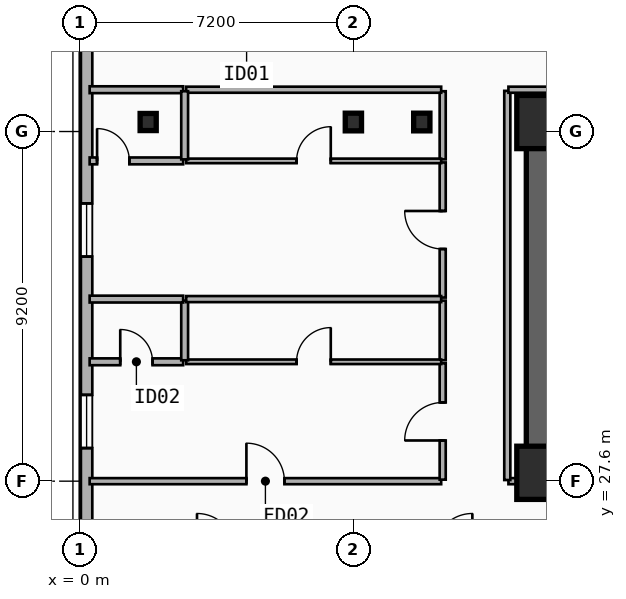
"""IFC4 building model, lengths in metres.
Left out: names, types, materials, properties, quantities, classifications, styles, units other than length and angle.
Written with IfcOpenShell. Run it as: python <this file> out.ifc"""

import sys

from ifc_helpers import new_model, si_unit, direction, frame, frame_2d, origin, origin_2d, place, context, subcontext, project, spatial, rectangle, i_section, extrude, element, fill, save


model = new_model("IFC4")
c1 = context("Model", 3, precision=1e-05, world=origin(), true_north=direction((0.0, 1.0)))
c2 = subcontext(c1, "Body", "Model", "MODEL_VIEW")
j1 = project(units=[si_unit("LENGTHUNIT", "METRE"), si_unit("PLANEANGLEUNIT", "RADIAN")], contexts=[c1])
p1 = place(None, origin())
s1 = spatial("IfcSite", under=j1, at=p1, CompositionType="ELEMENT")
p2 = place(p1, origin())
s2 = spatial("IfcBuilding", under=s1, at=p2, CompositionType="ELEMENT")
p3 = place(p2, frame((0.0, 0.0, 32.5)))
s3 = spatial("IfcBuildingStorey", under=s2, at=p3, CompositionType="ELEMENT", Elevation=32.5)
p4 = place(p3, frame((12.15, 37.05, 0.0), z_axis=(0.0, 0.0, 1.0), x_axis=(1.0, 0.0, 0.0)))
e1 = element("IfcWall", 1, at=p4, inside=s3, PredefinedType="SHEAR", context=c2, shape_type="SweptSolid", body=[
    extrude(rectangle(XDim=33.23, YDim=0.8, at=frame_2d((16.615, 0.0))), origin(), (0.0, 0.0, 1.0), 3.5),
])
p5 = place(p3, frame((21.18, 27.82, 0.0), z_axis=(0.0, 0.0, 1.0), x_axis=(-1.0, 0.0, 0.0)))
e2 = element("IfcWall", 2, at=p5, inside=s3, PredefinedType="SHEAR", context=c2, shape_type="SweptSolid", body=[
    extrude(rectangle(XDim=9.03, YDim=0.8, at=frame_2d((4.515, 0.0))), origin(), (0.0, 0.0, 1.0), 3.5),
])
p6 = place(p5, frame((2.68, 0.0, 0.0)))
e3 = element("IfcOpeningElement", 3, at=p6, cuts=e2, PredefinedType="OPENING", context=c2, shape_type="SweptSolid", body=[
    extrude(rectangle(XDim=1.1, YDim=2.15, at=frame_2d((0.55, 1.075))), frame((0.0, 0.41, 0.0), z_axis=(0.0, -1.0, 0.0), x_axis=(1.0, 0.0, 0.0)), (0.0, 0.0, 1.0), 0.82),
])
p7 = place(p3, frame((12.15, 28.22, 0.0), z_axis=(0.0, 0.0, 1.0), x_axis=(0.0, 1.0, 0.0)))
e4 = element("IfcWall", 4, at=p7, inside=s3, PredefinedType="SHEAR", context=c2, shape_type="SweptSolid", body=[
    extrude(rectangle(XDim=8.43, YDim=0.8, at=frame_2d((4.215, 0.0))), origin(), (0.0, 0.0, 1.0), 3.5),
])
for number, where, z_axis, x_axis in (
    (5, (12.2, 27.82, 0.0), (0.0, 0.0, 1.0), (1.0, 0.0, 0.0)),
    (6, (12.2, 37.05, 0.0), (0.0, 0.0, 1.0), (1.0, 0.0, 0.0)),
):
    element("IfcColumn", number, at=place(p3, frame(where, z_axis=z_axis, x_axis=x_axis)), inside=s3, PredefinedType="COLUMN", context=c2, shape_type="SweptSolid", body=[
        extrude(rectangle(XDim=1.4, YDim=1.4, at=origin_2d()), origin(), (0.0, 0.0, 1.0), 3.5),
    ])
p8 = place(p3, frame((9.0, 37.05, 0.0), z_axis=(0.0, 0.0, 1.0), x_axis=(1.0, 0.0, 0.0)))
e7 = element("IfcColumn", 7, at=p8, inside=s3, PredefinedType="COLUMN", context=c2, shape_type="SweptSolid", body=[
    extrude(i_section(OverallWidth=0.428, OverallDepth=0.465, WebThickness=0.045, FlangeThickness=0.073, FilletRadius=0.015, at=origin_2d()), origin(), (0.0, 0.0, 1.0), 3.5),
])
p9 = place(p3, frame((1.8, 37.05, 0.0), z_axis=(0.0, 0.0, 1.0), x_axis=(1.0, 0.0, 0.0)))
e8 = element("IfcColumn", 8, at=p9, inside=s3, PredefinedType="COLUMN", context=c2, shape_type="SweptSolid", body=[
    extrude(i_section(OverallWidth=0.424, OverallDepth=0.45, WebThickness=0.041, FlangeThickness=0.065, FilletRadius=0.015, at=origin_2d()), origin(), (0.0, 0.0, 1.0), 3.5),
])
p10 = place(p3, frame((7.2, 37.05, 0.0), z_axis=(0.0, 0.0, 1.0), x_axis=(1.0, 0.0, 0.0)))
e9 = element("IfcColumn", 9, at=p10, inside=s3, PredefinedType="COLUMN", context=c2, shape_type="SweptSolid", body=[
    extrude(i_section(OverallWidth=0.428, OverallDepth=0.465, WebThickness=0.045, FlangeThickness=0.073, FilletRadius=0.015, at=origin_2d()), origin(), (0.0, 0.0, 1.0), 3.5),
])
p11 = place(p3, frame((0.18, 25.8, 0.0), z_axis=(0.0, 0.0, 1.0), x_axis=(0.0, 1.0, 0.0)))
e10 = element("IfcWall", 10, at=p11, inside=s3, PredefinedType="SOLIDWALL", context=c2, shape_type="SweptSolid", body=[
    extrude(rectangle(XDim=15.2, YDim=0.3, at=frame_2d((7.6, 0.0))), origin(), (0.0, 0.0, 1.0), 3.24),
])
p12 = place(p11, frame((2.67, 0.0, 0.48)))
e11 = element("IfcOpeningElement", 11, at=p12, cuts=e10, PredefinedType="OPENING", context=c2, shape_type="SweptSolid", body=[
    extrude(rectangle(XDim=1.4, YDim=1.8, at=frame_2d((0.7, 0.9))), frame((0.0, 0.16, 0.0), z_axis=(0.0, -1.0, 0.0), x_axis=(1.0, 0.0, 0.0)), (0.0, 0.0, 1.0), 0.32),
])
p13 = place(p11, frame((7.709, 0.0, 0.48)))
e12 = element("IfcOpeningElement", 12, at=p13, cuts=e10, PredefinedType="OPENING", context=c2, shape_type="SweptSolid", body=[
    extrude(rectangle(XDim=1.4, YDim=1.8, at=frame_2d((0.7, 0.9))), frame((0.0, 0.16, 0.0), z_axis=(0.0, -1.0, 0.0), x_axis=(1.0, 0.0, 0.0)), (0.0, 0.0, 1.0), 0.32),
])
p14 = place(p3, frame((0.26, 27.6, 0.0), z_axis=(0.0, 0.0, 1.0), x_axis=(1.0, 0.0, 0.0)))
e13 = element("IfcWall", 13, at=p14, inside=s3, PredefinedType="PARTITIONING", context=c2, shape_type="SweptSolid", body=[
    extrude(rectangle(XDim=9.25, YDim=0.16, at=frame_2d((4.625, 0.0))), origin(), (0.0, 0.0, 1.0), 2.57),
])
p15 = place(p14, frame((4.125, 0.0, 0.0)))
e14 = element("IfcOpeningElement", 14, at=p15, cuts=e13, PredefinedType="OPENING", context=c2, shape_type="SweptSolid", body=[
    extrude(rectangle(XDim=1.0, YDim=2.15, at=frame_2d((0.5, 1.075))), frame((0.0, 0.09, 0.0), z_axis=(0.0, -1.0, 0.0), x_axis=(1.0, 0.0, 0.0)), (0.0, 0.0, 1.0), 0.18),
])
p16 = place(p3, frame((9.55, 27.64, 0.0), z_axis=(0.0, 0.0, 1.0), x_axis=(0.0, 1.0, 0.0)))
e15 = element("IfcWall", 15, at=p16, inside=s3, PredefinedType="PARTITIONING", context=c2, shape_type="SweptSolid", body=[
    extrude(rectangle(XDim=3.061, YDim=0.16, at=frame_2d((1.531, 0.0))), origin(), (0.0, 0.0, 1.0), 3.24),
])
p17 = place(p16, frame((1.031, 0.0, 0.0)))
e16 = element("IfcOpeningElement", 16, at=p17, cuts=e15, PredefinedType="OPENING", context=c2, shape_type="SweptSolid", body=[
    extrude(rectangle(XDim=1.0, YDim=2.15, at=frame_2d((0.5, 1.075))), frame((0.0, 0.09, 0.0), z_axis=(0.0, -1.0, 0.0), x_axis=(1.0, 0.0, 0.0)), (0.0, 0.0, 1.0), 0.18),
])
p18 = place(p3, frame((9.55, 30.781, 0.0), z_axis=(0.0, 0.0, 1.0), x_axis=(0.0, 1.0, 0.0)))
e17 = element("IfcWall", 17, at=p18, inside=s3, PredefinedType="PARTITIONING", context=c2, shape_type="SweptSolid", body=[
    extrude(rectangle(XDim=1.57, YDim=0.16, at=frame_2d((0.785, 0.0))), origin(), (0.0, 0.0, 1.0), 3.24),
])
p19 = place(p3, frame((9.55, 32.431, 0.0), z_axis=(0.0, 0.0, 1.0), x_axis=(0.0, 1.0, 0.0)))
e18 = element("IfcWall", 18, at=p19, inside=s3, PredefinedType="PARTITIONING", context=c2, shape_type="SweptSolid", body=[
    extrude(rectangle(XDim=3.556, YDim=0.16, at=frame_2d((1.778, 0.0))), origin(), (0.0, 0.0, 1.0), 3.24),
])
p20 = place(p19, frame((1.278, 0.0, 0.0)))
e19 = element("IfcOpeningElement", 19, at=p20, cuts=e18, PredefinedType="OPENING", context=c2, shape_type="SweptSolid", body=[
    extrude(rectangle(XDim=1.0, YDim=2.15, at=frame_2d((0.5, 1.075))), frame((0.0, 0.09, 0.0), z_axis=(0.0, -1.0, 0.0), x_axis=(1.0, 0.0, 0.0)), (0.0, 0.0, 1.0), 0.18),
])
p21 = place(p3, frame((9.55, 36.067, 0.0), z_axis=(0.0, 0.0, 1.0), x_axis=(0.0, 1.0, 0.0)))
e20 = element("IfcWall", 20, at=p21, inside=s3, PredefinedType="PARTITIONING", context=c2, shape_type="SweptSolid", body=[
    extrude(rectangle(XDim=1.793, YDim=0.16, at=frame_2d((0.896, 0.0))), origin(), (0.0, 0.0, 1.0), 2.72),
])
p22 = place(p3, frame((0.26, 37.9, 0.0), z_axis=(0.0, 0.0, 1.0), x_axis=(1.0, 0.0, 0.0)))
e21 = element("IfcWall", 21, at=p22, inside=s3, PredefinedType="PLUMBINGWALL", context=c2, shape_type="SweptSolid", body=[
    extrude(rectangle(XDim=2.46, YDim=0.18, at=frame_2d((1.23, 0.0))), origin(), (0.0, 0.0, 1.0), 3.24),
])
p23 = place(p3, frame((2.8, 37.9, 0.0), z_axis=(0.0, 0.0, 1.0), x_axis=(1.0, 0.0, 0.0)))
e22 = element("IfcWall", 22, at=p23, inside=s3, PredefinedType="PARTITIONING", context=c2, shape_type="SweptSolid", body=[
    extrude(rectangle(XDim=6.71, YDim=0.16, at=frame_2d((3.355, 0.0))), origin(), (0.0, 0.0, 1.0), 3.24),
])
p24 = place(p3, frame((0.26, 30.741, 0.0), z_axis=(0.0, 0.0, 1.0), x_axis=(1.0, 0.0, 0.0)))
e23 = element("IfcWall", 23, at=p24, inside=s3, PredefinedType="PLUMBINGWALL", context=c2, shape_type="SweptSolid", body=[
    extrude(rectangle(XDim=2.46, YDim=0.18, at=frame_2d((1.23, 0.0))), origin(), (0.0, 0.0, 1.0), 2.57),
])
p25 = place(p24, frame((0.805, 0.0, 0.0)))
e24 = element("IfcOpeningElement", 24, at=p25, cuts=e23, PredefinedType="OPENING", context=c2, shape_type="SweptSolid", body=[
    extrude(rectangle(XDim=0.85, YDim=2.1, at=frame_2d((0.425, 1.05))), frame((0.0, 0.1, 0.0), z_axis=(0.0, -1.0, 0.0), x_axis=(1.0, 0.0, 0.0)), (0.0, 0.0, 1.0), 0.2),
])
p26 = place(p3, frame((2.8, 30.741, 0.0), z_axis=(0.0, 0.0, 1.0), x_axis=(1.0, 0.0, 0.0)))
e25 = element("IfcWall", 25, at=p26, inside=s3, PredefinedType="PARTITIONING", context=c2, shape_type="SweptSolid", body=[
    extrude(rectangle(XDim=6.71, YDim=0.12, at=frame_2d((3.355, 0.0))), origin(), (0.0, 0.0, 1.0), 2.57),
])
p27 = place(p26, frame((2.905, 0.0, 0.0)))
e26 = element("IfcOpeningElement", 26, at=p27, cuts=e25, PredefinedType="OPENING", context=c2, shape_type="SweptSolid", body=[
    extrude(rectangle(XDim=0.9, YDim=2.1, at=frame_2d((0.45, 1.05))), frame((0.0, 0.07, 0.0), z_axis=(0.0, -1.0, 0.0), x_axis=(1.0, 0.0, 0.0)), (0.0, 0.0, 1.0), 0.14),
])
p28 = place(p3, frame((2.76, 30.781, 0.0), z_axis=(0.0, 0.0, 1.0), x_axis=(0.0, 1.0, 0.0)))
e27 = element("IfcWall", 27, at=p28, inside=s3, PredefinedType="PLUMBINGWALL", context=c2, shape_type="SweptSolid", body=[
    extrude(rectangle(XDim=1.57, YDim=0.18, at=frame_2d((0.785, 0.0))), origin(), (0.0, 0.0, 1.0), 3.24),
])
p29 = place(p3, frame((0.26, 32.391, 0.0), z_axis=(0.0, 0.0, 1.0), x_axis=(1.0, 0.0, 0.0)))
e28 = element("IfcWall", 28, at=p29, inside=s3, PredefinedType="PLUMBINGWALL", context=c2, shape_type="SweptSolid", body=[
    extrude(rectangle(XDim=2.46, YDim=0.18, at=frame_2d((1.23, 0.0))), origin(), (0.0, 0.0, 1.0), 2.57),
])
p30 = place(p3, frame((2.8, 32.391, 0.0), z_axis=(0.0, 0.0, 1.0), x_axis=(1.0, 0.0, 0.0)))
e29 = element("IfcWall", 29, at=p30, inside=s3, PredefinedType="PARTITIONING", context=c2, shape_type="SweptSolid", body=[
    extrude(rectangle(XDim=6.71, YDim=0.16, at=frame_2d((3.355, 0.0))), origin(), (0.0, 0.0, 1.0), 2.57),
])
p31 = place(p3, frame((0.26, 36.027, 0.0), z_axis=(0.0, 0.0, 1.0), x_axis=(1.0, 0.0, 0.0)))
e30 = element("IfcWall", 30, at=p31, inside=s3, PredefinedType="PLUMBINGWALL", context=c2, shape_type="SweptSolid", body=[
    extrude(rectangle(XDim=2.46, YDim=0.18, at=frame_2d((1.23, 0.0))), origin(), (0.0, 0.0, 1.0), 2.57),
])
p32 = place(p31, frame((0.195, 0.0, 0.0)))
e31 = element("IfcOpeningElement", 31, at=p32, cuts=e30, PredefinedType="OPENING", context=c2, shape_type="SweptSolid", body=[
    extrude(rectangle(XDim=0.85, YDim=2.1, at=frame_2d((0.425, 1.05))), frame((0.0, 0.1, 0.0), z_axis=(0.0, -1.0, 0.0), x_axis=(1.0, 0.0, 0.0)), (0.0, 0.0, 1.0), 0.2),
])
p33 = place(p3, frame((2.8, 36.027, 0.0), z_axis=(0.0, 0.0, 1.0), x_axis=(1.0, 0.0, 0.0)))
e32 = element("IfcWall", 32, at=p33, inside=s3, PredefinedType="PARTITIONING", context=c2, shape_type="SweptSolid", body=[
    extrude(rectangle(XDim=6.71, YDim=0.12, at=frame_2d((3.355, 0.0))), origin(), (0.0, 0.0, 1.0), 2.57),
])
p34 = place(p33, frame((2.905, 0.0, 0.0)))
e33 = element("IfcOpeningElement", 33, at=p34, cuts=e32, PredefinedType="OPENING", context=c2, shape_type="SweptSolid", body=[
    extrude(rectangle(XDim=0.9, YDim=2.1, at=frame_2d((0.45, 1.05))), frame((0.0, 0.07, 0.0), z_axis=(0.0, -1.0, 0.0), x_axis=(1.0, 0.0, 0.0)), (0.0, 0.0, 1.0), 0.14),
])
p35 = place(p3, frame((2.76, 36.067, 0.0), z_axis=(0.0, 0.0, 1.0), x_axis=(0.0, 1.0, 0.0)))
e34 = element("IfcWall", 34, at=p35, inside=s3, PredefinedType="PLUMBINGWALL", context=c2, shape_type="SweptSolid", body=[
    extrude(rectangle(XDim=1.793, YDim=0.18, at=frame_2d((0.896, 0.0))), origin(), (0.0, 0.0, 1.0), 2.72),
])
p36 = place(p3, frame((11.28, 27.6, 0.0), z_axis=(0.0, 0.0, 1.0), x_axis=(1.0, 0.0, 0.0)))
e35 = element("IfcWall", 35, at=p36, inside=s3, PredefinedType="PARTITIONING", context=c2, shape_type="SweptSolid", body=[
    extrude(rectangle(XDim=0.84, YDim=0.16, at=frame_2d((0.42, 0.0))), origin(), (0.0, 0.0, 1.0), 2.28),
])
p37 = place(p3, frame((11.25, 27.63, 0.0), z_axis=(0.0, 0.0, 1.0), x_axis=(0.0, 1.0, 0.0)))
e36 = element("IfcWall", 36, at=p37, inside=s3, PredefinedType="PARTITIONING", context=c2, shape_type="SweptSolid", body=[
    extrude(rectangle(XDim=10.24, YDim=0.16, at=frame_2d((5.12, 0.0))), origin(), (0.0, 0.0, 1.0), 2.72),
])
p38 = place(p3, frame((11.28, 37.9, 0.0), z_axis=(0.0, 0.0, 1.0), x_axis=(1.0, 0.0, 0.0)))
e37 = element("IfcWall", 37, at=p38, inside=s3, PredefinedType="PARTITIONING", context=c2, shape_type="SweptSolid", body=[
    extrude(rectangle(XDim=35.04, YDim=0.16, at=frame_2d((17.52, 0.0))), origin(), (0.0, 0.0, 1.0), 3.24),
])
p39 = place(p12, origin())
e38 = element("IfcWindow", 38, at=p39, inside=s3, PartitioningType="SINGLE_PANEL", PredefinedType="WINDOW", context=c2, shape_type="SweptSolid", body=[
    extrude(rectangle(XDim=1.4, YDim=1.8, at=frame_2d((0.7, 0.9))), frame((0.0, 0.03, 0.0), z_axis=(0.0, -1.0, 0.0), x_axis=(1.0, 0.0, 0.0)), (0.0, 0.0, 1.0), 0.06),
])
fill(e11, e38)
p40 = place(p13, origin())
e39 = element("IfcWindow", 39, at=p40, inside=s3, PartitioningType="SINGLE_PANEL", PredefinedType="WINDOW", context=c2, shape_type="SweptSolid", body=[
    extrude(rectangle(XDim=1.4, YDim=1.8, at=frame_2d((0.7, 0.9))), frame((0.0, 0.03, 0.0), z_axis=(0.0, -1.0, 0.0), x_axis=(1.0, 0.0, 0.0)), (0.0, 0.0, 1.0), 0.06),
])
fill(e12, e39)
p41 = place(p15, origin())
e40 = element("IfcDoor", 40, at=p41, inside=s3, OperationType="SINGLE_SWING_LEFT", PredefinedType="DOOR", context=c2, shape_type="SweptSolid", body=[
    extrude(rectangle(XDim=1.0, YDim=2.15, at=frame_2d((0.5, 1.075))), frame((0.0, 0.025, 0.0), z_axis=(0.0, -1.0, 0.0), x_axis=(1.0, 0.0, 0.0)), (0.0, 0.0, 1.0), 0.05),
])
fill(e14, e40)
p42 = place(p17, origin())
e41 = element("IfcDoor", 41, at=p42, inside=s3, OperationType="SINGLE_SWING_LEFT", PredefinedType="DOOR", context=c2, shape_type="SweptSolid", body=[
    extrude(rectangle(XDim=1.0, YDim=2.15, at=frame_2d((0.5, 1.075))), frame((0.0, 0.025, 0.0), z_axis=(0.0, -1.0, 0.0), x_axis=(1.0, 0.0, 0.0)), (0.0, 0.0, 1.0), 0.05),
])
fill(e16, e41)
p43 = place(p20, origin())
e42 = element("IfcDoor", 42, at=p43, inside=s3, OperationType="SINGLE_SWING_RIGHT", PredefinedType="DOOR", context=c2, shape_type="SweptSolid", body=[
    extrude(rectangle(XDim=1.0, YDim=2.15, at=frame_2d((0.5, 1.075))), frame((0.0, 0.025, 0.0), z_axis=(0.0, -1.0, 0.0), x_axis=(1.0, 0.0, 0.0)), (0.0, 0.0, 1.0), 0.05),
])
fill(e19, e42)
p44 = place(p25, origin())
e43 = element("IfcDoor", 43, at=p44, inside=s3, OperationType="SINGLE_SWING_LEFT", PredefinedType="DOOR", context=c2, shape_type="SweptSolid", body=[
    extrude(rectangle(XDim=0.85, YDim=2.1, at=frame_2d((0.425, 1.05))), frame((0.0, 0.025, 0.0), z_axis=(0.0, -1.0, 0.0), x_axis=(1.0, 0.0, 0.0)), (0.0, 0.0, 1.0), 0.05),
])
fill(e24, e43)
p45 = place(p27, origin())
e44 = element("IfcDoor", 44, at=p45, inside=s3, OperationType="SINGLE_SWING_RIGHT", PredefinedType="DOOR", context=c2, shape_type="SweptSolid", body=[
    extrude(rectangle(XDim=0.9, YDim=2.1, at=frame_2d((0.45, 1.05))), frame((0.0, 0.025, 0.0), z_axis=(0.0, -1.0, 0.0), x_axis=(1.0, 0.0, 0.0)), (0.0, 0.0, 1.0), 0.05),
])
fill(e26, e44)
p46 = place(p32, origin())
e45 = element("IfcDoor", 45, at=p46, inside=s3, OperationType="SINGLE_SWING_LEFT", PredefinedType="DOOR", context=c2, shape_type="SweptSolid", body=[
    extrude(rectangle(XDim=0.85, YDim=2.1, at=frame_2d((0.425, 1.05))), frame((0.0, 0.025, 0.0), z_axis=(0.0, -1.0, 0.0), x_axis=(1.0, 0.0, 0.0)), (0.0, 0.0, 1.0), 0.05),
])
fill(e31, e45)
p47 = place(p34, origin())
e46 = element("IfcDoor", 46, at=p47, inside=s3, OperationType="SINGLE_SWING_RIGHT", PredefinedType="DOOR", context=c2, shape_type="SweptSolid", body=[
    extrude(rectangle(XDim=0.9, YDim=2.1, at=frame_2d((0.45, 1.05))), frame((0.0, 0.025, 0.0), z_axis=(0.0, -1.0, 0.0), x_axis=(1.0, 0.0, 0.0)), (0.0, 0.0, 1.0), 0.05),
])
fill(e33, e46)
save(model, sys.argv[1])
